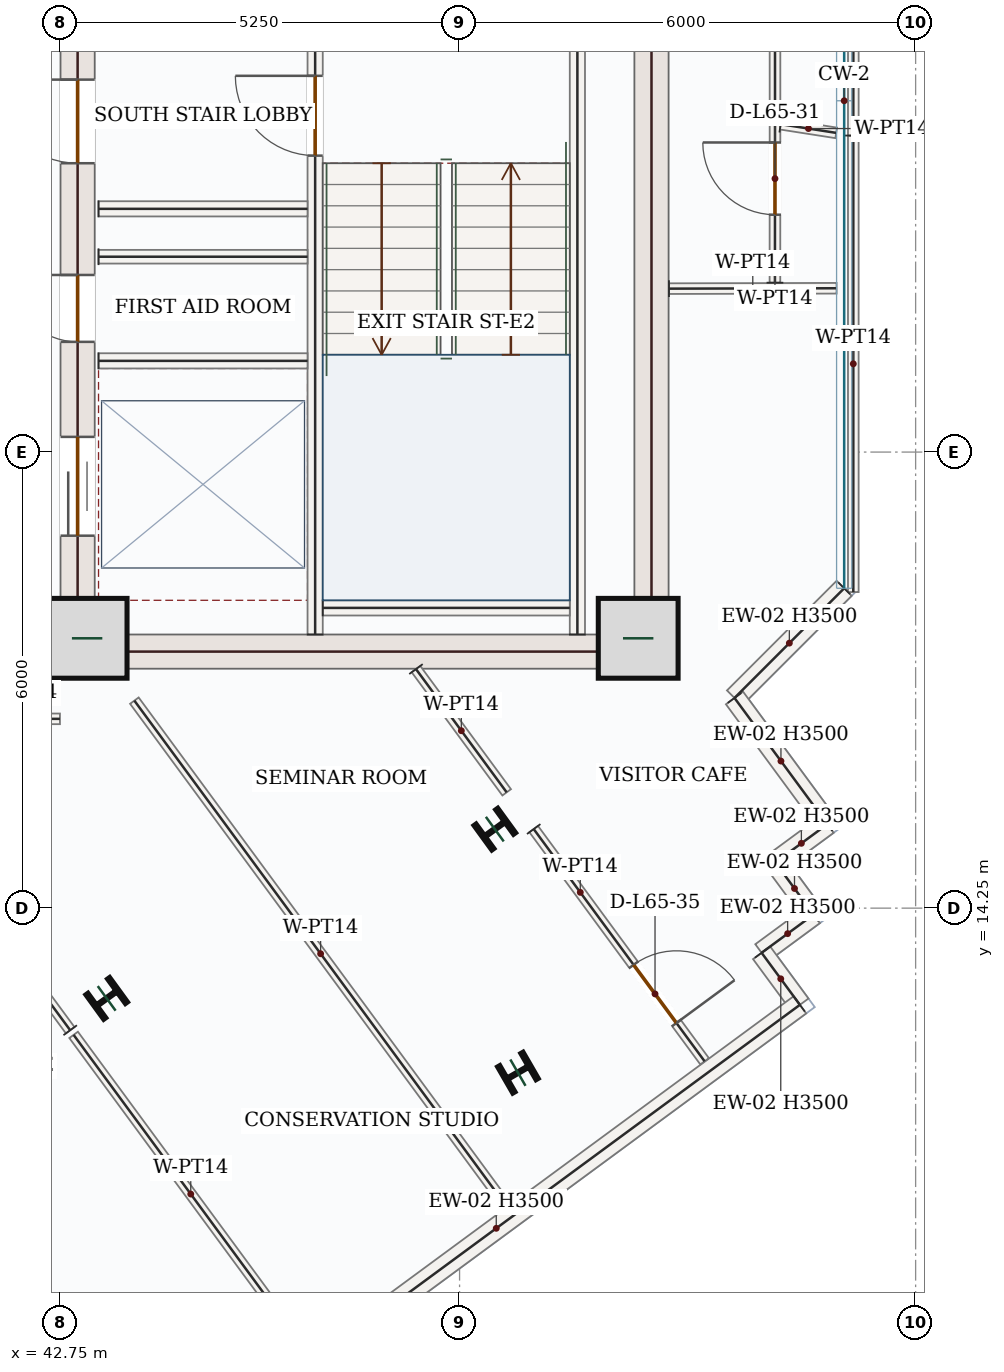
"""IFC4 building model, lengths in metres.
Left out: names, types, materials, properties, quantities, classifications, styles, units other than length and angle.
Written with IfcOpenShell. Run it as: python <this file> out.ifc"""

import sys

from ifc_helpers import new_model, si_unit, direction, frame, frame_2d, origin, origin_2d, place, context, subcontext, project, spatial, rectangle, i_section, extrude, source, transform, mapped, element, fill, save


model = new_model("IFC4")
c1 = context("Model", 3, precision=1e-05, world=origin(), true_north=direction((0.0, 1.0)))
c2 = subcontext(c1, "Body", "Model", "MODEL_VIEW")
j1 = project(units=[si_unit("LENGTHUNIT", "METRE"), si_unit("PLANEANGLEUNIT", "RADIAN")], contexts=[c1])
p1 = place(None, origin())
s1 = spatial("IfcSite", under=j1, at=p1, CompositionType="ELEMENT")
p2 = place(p1, origin())
s2 = spatial("IfcBuilding", under=s1, at=p2, CompositionType="ELEMENT")
p3 = place(p2, frame((0.0, 0.0, 272.85)))
s3 = spatial("IfcBuildingStorey", under=s2, at=p3, CompositionType="ELEMENT", Elevation=272.85)
p4 = place(p3, frame((42.975, 17.4, 0.0), z_axis=(0.0, 0.0, 1.0), x_axis=(0.0, 1.0, 0.0)))
e1 = element("IfcWall", 1, at=p4, inside=s3, PredefinedType="SHEAR", context=c2, shape_type="SweptSolid", body=[
    extrude(rectangle(XDim=8.55, YDim=0.45, at=frame_2d((4.275, 0.0))), origin(), (0.0, 0.0, 1.0), 3.5),
])
p5 = place(p4, frame((6.65, 0.0, 0.0)))
e2 = element("IfcOpeningElement", 2, at=p5, cuts=e1, PredefinedType="OPENING", context=c2, shape_type="SweptSolid", body=[
    extrude(rectangle(XDim=1.1, YDim=2.2, at=frame_2d((0.55, 1.1))), frame((0.0, 0.235, 0.0), z_axis=(0.0, -1.0, 0.0), x_axis=(1.0, 0.0, 0.0)), (0.0, 0.0, 1.0), 0.47),
])
p6 = place(p4, frame((1.75, 0.0, 0.0)))
e3 = element("IfcOpeningElement", 3, at=p6, cuts=e1, PredefinedType="OPENING", context=c2, shape_type="SweptSolid", body=[
    extrude(rectangle(XDim=1.3, YDim=2.2, at=frame_2d((0.65, 1.1))), frame((0.0, 0.235, 0.0), z_axis=(0.0, -1.0, 0.0), x_axis=(1.0, 0.0, 0.0)), (0.0, 0.0, 1.0), 0.47),
])
p7 = place(p4, frame((4.3, 0.0, 0.0)))
e4 = element("IfcOpeningElement", 4, at=p7, cuts=e1, PredefinedType="OPENING", context=c2, shape_type="SweptSolid", body=[
    extrude(rectangle(XDim=0.88, YDim=2.1, at=frame_2d((0.44, 1.05))), frame((0.0, 0.235, 0.0), z_axis=(0.0, -1.0, 0.0), x_axis=(1.0, 0.0, 0.0)), (0.0, 0.0, 1.0), 0.47),
])
m1 = source(origin(), c2, "Body", "SweptSolid", [
    extrude(rectangle(XDim=8.55, YDim=0.45, at=frame_2d((4.275, 0.0))), origin(), (0.0, 0.0, 1.0), 3.5),
])
p8 = place(p3, frame((50.525, 17.4, 0.0), z_axis=(0.0, 0.0, 1.0), x_axis=(0.0, 1.0, 0.0)))
e5 = element("IfcWall", 5, at=p8, inside=s3, PredefinedType="SHEAR", context=c2, shape_type="MappedRepresentation", body=[
    mapped(m1, transform((0.0, 0.0, 0.0), x_axis=(1.0, 0.0, 0.0), y_axis=(0.0, 1.0, 0.0), z_axis=(0.0, 0.0, 1.0), scale=1.0)),
])
m2 = source(origin(), c2, "Body", "SweptSolid", [
    extrude(rectangle(XDim=7.1, YDim=0.45, at=frame_2d((3.55, 0.0))), origin(), (0.0, 0.0, 1.0), 3.5),
])
p9 = place(p3, frame((43.2, 17.625, 0.0), z_axis=(0.0, 0.0, 1.0), x_axis=(1.0, 0.0, 0.0)))
e6 = element("IfcWall", 6, at=p9, inside=s3, PredefinedType="SHEAR", context=c2, shape_type="MappedRepresentation", body=[
    mapped(m2, transform((0.0, 0.0, 0.0), x_axis=(1.0, 0.0, 0.0), y_axis=(0.0, 1.0, 0.0), z_axis=(0.0, 0.0, 1.0), scale=1.0)),
])
m3 = source(origin(), c2, "Body", "SweptSolid", [
    extrude(rectangle(XDim=1.05, YDim=1.05, at=origin_2d()), origin(), (0.0, 0.0, 1.0), 3.75),
])
for number, where, z_axis, x_axis in (
    (7, (43.1, 17.8, 0.0), (0.0, 0.0, 1.0), (1.0, 0.0, 0.0)),
    (8, (50.35, 17.8, 0.0), (0.0, 0.0, 1.0), (1.0, 0.0, 0.0)),
):
    element("IfcColumn", number, at=place(p3, frame(where, z_axis=z_axis, x_axis=x_axis)), inside=s3, PredefinedType="COLUMN", context=c2, shape_type="MappedRepresentation", body=[
        mapped(m3, transform((0.0, 0.0, 0.0), x_axis=(1.0, 0.0, 0.0), y_axis=(0.0, 1.0, 0.0), z_axis=(0.0, 0.0, 1.0), scale=1.0)),
    ])
m4 = source(origin(), c2, "Body", "SweptSolid", [
    extrude(i_section(OverallWidth=0.399, OverallDepth=0.386, WebThickness=0.021, FlangeThickness=0.033, FilletRadius=0.018, at=origin_2d()), origin(), (0.0, 0.0, 1.0), 3.75),
])
for number, where, z_axis, x_axis in (
    (9, (43.357, 13.063, 0.0), (0.0, 0.0, 1.0), (-0.588, 0.809, 0.0)),
    (10, (48.464, 15.289, 0.0), (0.0, 0.0, 1.0), (-0.588, 0.809, 0.0)),
    (11, (48.768, 12.086, 0.0), (0.0, 0.0, 1.0), (-0.5, 0.866, 0.0)),
):
    element("IfcColumn", number, at=place(p3, frame(where, z_axis=z_axis, x_axis=x_axis)), inside=s3, PredefinedType="COLUMN", context=c2, shape_type="MappedRepresentation", body=[
        mapped(m4, transform((0.0, 0.0, 0.0), x_axis=(1.0, 0.0, 0.0), y_axis=(0.0, 1.0, 0.0), z_axis=(0.0, 0.0, 1.0), scale=1.0)),
    ])
m5 = source(origin(), c2, "Body", "SweptSolid", [
    extrude(rectangle(XDim=2.041, YDim=0.28, at=frame_2d((1.02, 0.0))), origin(), (0.0, 0.0, 1.0), 3.5),
])
p10 = place(p3, frame((53.06, 18.458, 0.0), z_axis=(0.0, 0.0, 1.0), x_axis=(-0.707106781187, -0.707106781187, 0.0)))
e12 = element("IfcWall", 12, at=p10, inside=s3, PredefinedType="SOLIDWALL", context=c2, shape_type="MappedRepresentation", body=[
    mapped(m5, transform((0.0, 0.0, 0.0), x_axis=(1.0, 0.0, 0.0), y_axis=(0.0, 1.0, 0.0), z_axis=(0.0, 0.0, 1.0), scale=1.0)),
])
m6 = source(origin(), c2, "Body", "SweptSolid", [
    extrude(rectangle(XDim=2.062, YDim=0.28, at=frame_2d((1.031, 0.0))), origin(), (0.0, 0.0, 1.0), 3.5),
])
p11 = place(p3, frame((51.617, 17.015, 0.0), z_axis=(0.0, 0.0, 1.0), x_axis=(0.592718215209, -0.80540990642, 0.0)))
e13 = element("IfcWall", 13, at=p11, inside=s3, PredefinedType="SOLIDWALL", context=c2, shape_type="MappedRepresentation", body=[
    mapped(m6, transform((0.0, 0.0, 0.0), x_axis=(1.0, 0.0, 0.0), y_axis=(0.0, 1.0, 0.0), z_axis=(0.0, 0.0, 1.0), scale=1.0)),
])
m7 = source(origin(), c2, "Body", "SweptSolid", [
    extrude(rectangle(XDim=0.85, YDim=0.28, at=frame_2d((0.425, 0.0))), origin(), (0.0, 0.0, 1.0), 3.5),
])
p12 = place(p3, frame((52.839, 15.355, 0.0), z_axis=(0.0, 0.0, 1.0), x_axis=(-0.80534450163, -0.592807079659, 0.0)))
e14 = element("IfcWall", 14, at=p12, inside=s3, PredefinedType="SOLIDWALL", context=c2, shape_type="MappedRepresentation", body=[
    mapped(m7, transform((0.0, 0.0, 0.0), x_axis=(1.0, 0.0, 0.0), y_axis=(0.0, 1.0, 0.0), z_axis=(0.0, 0.0, 1.0), scale=1.0)),
])
m8 = source(origin(), c2, "Body", "SweptSolid", [
    extrude(rectangle(XDim=0.85, YDim=0.28, at=frame_2d((0.425, 0.0))), origin(), (0.0, 0.0, 1.0), 3.5),
])
for number, where, z_axis, x_axis in (
    (15, (52.155, 14.851, 0.0), (0.0, 0.0, 1.0), (0.593, -0.805, 0.0)),
    (16, (52.658, 14.166, 0.0), (0.0, 0.0, 1.0), (-0.805, -0.593, 0.0)),
):
    element("IfcWall", number, at=place(p3, frame(where, z_axis=z_axis, x_axis=x_axis)), inside=s3, PredefinedType="SOLIDWALL", context=c2, shape_type="MappedRepresentation", body=[
        mapped(m8, transform((0.0, 0.0, 0.0), x_axis=(1.0, 0.0, 0.0), y_axis=(0.0, 1.0, 0.0), z_axis=(0.0, 0.0, 1.0), scale=1.0)),
    ])
m9 = source(origin(), c2, "Body", "SweptSolid", [
    extrude(rectangle(XDim=0.85, YDim=0.28, at=frame_2d((0.425, 0.0))), origin(), (0.0, 0.0, 1.0), 3.5),
])
p13 = place(p3, frame((51.974, 13.663, 0.0), z_axis=(0.0, 0.0, 1.0), x_axis=(0.592669983425, -0.805445398986, 0.0)))
e17 = element("IfcWall", 17, at=p13, inside=s3, PredefinedType="SOLIDWALL", context=c2, shape_type="MappedRepresentation", body=[
    mapped(m9, transform((0.0, 0.0, 0.0), x_axis=(1.0, 0.0, 0.0), y_axis=(0.0, 1.0, 0.0), z_axis=(0.0, 0.0, 1.0), scale=1.0)),
])
m10 = source(origin(), c2, "Body", "SweptSolid", [
    extrude(rectangle(XDim=9.92, YDim=0.28, at=frame_2d((4.96, 0.0))), origin(), (0.0, 0.0, 1.0), 3.5),
])
p14 = place(p3, frame((52.478, 12.978, 0.0), z_axis=(0.0, 0.0, 1.0), x_axis=(-0.805418797839, -0.592706132994, 0.0)))
e18 = element("IfcWall", 18, at=p14, inside=s3, PredefinedType="SOLIDWALL", context=c2, shape_type="MappedRepresentation", body=[
    mapped(m10, transform((0.0, 0.0, 0.0), x_axis=(1.0, 0.0, 0.0), y_axis=(0.0, 1.0, 0.0), z_axis=(0.0, 0.0, 1.0), scale=1.0)),
])
m11 = source(origin(), c2, "Body", "SweptSolid", [
    extrude(rectangle(XDim=7.87, YDim=0.2, at=frame_2d((3.935, 0.0))), origin(), (0.0, 0.0, 1.0), 3.5),
])
p15 = place(p3, frame((49.55, 17.85, 0.0), z_axis=(0.0, 0.0, 1.0), x_axis=(0.0, 1.0, 0.0)))
e19 = element("IfcWall", 19, at=p15, inside=s3, PredefinedType="SOLIDWALL", context=c2, shape_type="MappedRepresentation", body=[
    mapped(m11, transform((0.0, 0.0, 0.0), x_axis=(1.0, 0.0, 0.0), y_axis=(0.0, 1.0, 0.0), z_axis=(0.0, 0.0, 1.0), scale=1.0)),
])
p16 = place(p3, frame((46.1, 17.85, 0.0), z_axis=(0.0, 0.0, 1.0), x_axis=(0.0, 1.0, 0.0)))
e20 = element("IfcWall", 20, at=p16, inside=s3, PredefinedType="SOLIDWALL", context=c2, shape_type="SweptSolid", body=[
    extrude(rectangle(XDim=8.0, YDim=0.2, at=frame_2d((4.0, 0.0))), origin(), (0.0, 0.0, 1.0), 3.5),
])
p17 = place(p16, frame((6.3, 0.0, 0.0)))
e21 = element("IfcOpeningElement", 21, at=p17, cuts=e20, PredefinedType="OPENING", context=c2, shape_type="SweptSolid", body=[
    extrude(rectangle(XDim=1.05, YDim=2.15, at=frame_2d((0.525, 1.075))), frame((0.0, 0.11, 0.0), z_axis=(0.0, -1.0, 0.0), x_axis=(1.0, 0.0, 0.0)), (0.0, 0.0, 1.0), 0.22),
])
m12 = source(origin(), c2, "Body", "SweptSolid", [
    extrude(rectangle(XDim=3.25, YDim=0.2, at=frame_2d((1.625, 0.0))), origin(), (0.0, 0.0, 1.0), 3.5),
])
p18 = place(p3, frame((46.2, 18.2, 0.0), z_axis=(0.0, 0.0, 1.0), x_axis=(1.0, 0.0, 0.0)))
e22 = element("IfcWall", 22, at=p18, inside=s3, PredefinedType="SOLIDWALL", context=c2, shape_type="MappedRepresentation", body=[
    mapped(m12, transform((0.0, 0.0, 0.0), x_axis=(1.0, 0.0, 0.0), y_axis=(0.0, 1.0, 0.0), z_axis=(0.0, 0.0, 1.0), scale=1.0)),
])
m13 = source(origin(), c2, "Body", "SweptSolid", [
    extrude(rectangle(XDim=2.75, YDim=0.2, at=frame_2d((1.375, 0.0))), origin(), (0.0, 0.0, 1.0), 3.5),
])
for number, where, z_axis, x_axis in (
    (23, (43.25, 23.45, 0.0), (0.0, 0.0, 1.0), (1.0, 0.0, 0.0)),
    (24, (43.25, 21.45, 0.0), (0.0, 0.0, 1.0), (1.0, 0.0, 0.0)),
):
    element("IfcWall", number, at=place(p3, frame(where, z_axis=z_axis, x_axis=x_axis)), inside=s3, PredefinedType="SOLIDWALL", context=c2, shape_type="MappedRepresentation", body=[
        mapped(m13, transform((0.0, 0.0, 0.0), x_axis=(1.0, 0.0, 0.0), y_axis=(0.0, 1.0, 0.0), z_axis=(0.0, 0.0, 1.0), scale=1.0)),
    ])
m14 = source(origin(), c2, "Body", "SweptSolid", [
    extrude(rectangle(XDim=2.75, YDim=0.18, at=frame_2d((1.375, 0.0))), origin(), (0.0, 0.0, 1.0), 3.5),
])
p19 = place(p3, frame((43.25, 22.82, 0.0), z_axis=(0.0, 0.0, 1.0), x_axis=(1.0, 0.0, 0.0)))
e25 = element("IfcWall", 25, at=p19, inside=s3, PredefinedType="PARTITIONING", context=c2, shape_type="MappedRepresentation", body=[
    mapped(m14, transform((0.0, 0.0, 0.0), x_axis=(1.0, 0.0, 0.0), y_axis=(0.0, 1.0, 0.0), z_axis=(0.0, 0.0, 1.0), scale=1.0)),
])
m15 = source(origin(), c2, "Body", "SweptSolid", [
    extrude(rectangle(XDim=8.268, YDim=0.14, at=frame_2d((4.134, 0.0))), origin(), (0.0, 0.0, 1.0), 3.5),
])
p20 = place(p3, frame((48.622, 10.321, 0.0), z_axis=(0.0, 0.0, 1.0), x_axis=(-0.592718477136, 0.805409713663, 0.0)))
e26 = element("IfcWall", 26, at=p20, inside=s3, PredefinedType="PARTITIONING", context=c2, shape_type="MappedRepresentation", body=[
    mapped(m15, transform((0.0, 0.0, 0.0), x_axis=(1.0, 0.0, 0.0), y_axis=(0.0, 1.0, 0.0), z_axis=(0.0, 0.0, 1.0), scale=1.0)),
])
m16 = source(origin(), c2, "Body", "SweptSolid", [
    extrude(rectangle(XDim=2.013, YDim=0.14, at=frame_2d((1.006, 0.0))), origin(), (0.0, 0.0, 1.0), 3.5),
])
p21 = place(p3, frame((47.427, 17.395, 0.0), z_axis=(0.0, 0.0, 1.0), x_axis=(0.592698341467, -0.80542453155, 0.0)))
e27 = element("IfcWall", 27, at=p21, inside=s3, PredefinedType="PARTITIONING", context=c2, shape_type="MappedRepresentation", body=[
    mapped(m16, transform((0.0, 0.0, 0.0), x_axis=(1.0, 0.0, 0.0), y_axis=(0.0, 1.0, 0.0), z_axis=(0.0, 0.0, 1.0), scale=1.0)),
])
p22 = place(p3, frame((48.975, 15.29, 0.0), z_axis=(0.0, 0.0, 1.0), x_axis=(0.592735674873, -0.805397057192, 0.0)))
e28 = element("IfcWall", 28, at=p22, inside=s3, PredefinedType="PARTITIONING", context=c2, shape_type="SweptSolid", body=[
    extrude(rectangle(XDim=3.793, YDim=0.14, at=frame_2d((1.896, 0.0))), origin(), (0.0, 0.0, 1.0), 3.5),
])
p23 = place(p22, frame((2.218, 0.0, 0.0)))
e29 = element("IfcOpeningElement", 29, at=p23, cuts=e28, PredefinedType="OPENING", context=c2, shape_type="SweptSolid", body=[
    extrude(rectangle(XDim=0.95, YDim=2.15, at=frame_2d((0.475, 1.075))), frame((0.0, 0.08, 0.0), z_axis=(0.0, -1.0, 0.0), x_axis=(1.0, 0.0, 0.0)), (0.0, 0.0, 1.0), 0.16),
])
m17 = source(origin(), c2, "Body", "SweptSolid", [
    extrude(rectangle(XDim=2.205, YDim=0.14, at=frame_2d((1.103, 0.0))), origin(), (0.0, 0.0, 1.0), 3.5),
])
p24 = place(p3, frame((50.755, 22.4, 0.0), z_axis=(0.0, 0.0, 1.0), x_axis=(0.999997297044, 0.002325060146, 0.0)))
e30 = element("IfcWall", 30, at=p24, inside=s3, PredefinedType="PARTITIONING", context=c2, shape_type="MappedRepresentation", body=[
    mapped(m17, transform((0.0, 0.0, 0.0), x_axis=(1.0, 0.0, 0.0), y_axis=(0.0, 1.0, 0.0), z_axis=(0.0, 0.0, 1.0), scale=1.0)),
])
p25 = place(p3, frame((52.149, 22.478, 0.0), z_axis=(0.0, 0.0, 1.0), x_axis=(0.000465766135, 0.999999891531, 0.0)))
e31 = element("IfcWall", 31, at=p25, inside=s3, PredefinedType="PARTITIONING", context=c2, shape_type="SweptSolid", body=[
    extrude(rectangle(XDim=2.097, YDim=0.14, at=frame_2d((1.048, 0.0))), origin(), (0.0, 0.0, 1.0), 3.5),
])
p26 = place(p25, frame((0.894, 0.0, 0.0)))
e32 = element("IfcOpeningElement", 32, at=p26, cuts=e31, PredefinedType="OPENING", context=c2, shape_type="SweptSolid", body=[
    extrude(rectangle(XDim=0.95, YDim=2.15, at=frame_2d((0.475, 1.075))), frame((0.0, 0.08, 0.0), z_axis=(0.0, -1.0, 0.0), x_axis=(1.0, 0.0, 0.0)), (0.0, 0.0, 1.0), 0.16),
])
m18 = source(origin(), c2, "Body", "SweptSolid", [
    extrude(rectangle(XDim=0.739, YDim=0.14, at=frame_2d((0.369, 0.0))), origin(), (0.0, 0.0, 1.0), 3.5),
])
p27 = place(p3, frame((52.225, 24.563, 0.0), z_axis=(0.0, 0.0, 1.0), x_axis=(0.988021482099, -0.154316398709, 0.0)))
e33 = element("IfcWall", 33, at=p27, inside=s3, PredefinedType="PARTITIONING", context=c2, shape_type="MappedRepresentation", body=[
    mapped(m18, transform((0.0, 0.0, 0.0), x_axis=(1.0, 0.0, 0.0), y_axis=(0.0, 1.0, 0.0), z_axis=(0.0, 0.0, 1.0), scale=1.0)),
])
m19 = source(origin(), c2, "Body", "SweptSolid", [
    extrude(rectangle(XDim=6.006, YDim=0.14, at=frame_2d((3.003, 0.0))), origin(), (0.0, 0.0, 1.0), 3.5),
])
p28 = place(p3, frame((53.18, 24.414, 0.0), z_axis=(0.0, 0.0, 1.0), x_axis=(0.0, -1.0, 0.0)))
e34 = element("IfcWall", 34, at=p28, inside=s3, PredefinedType="PARTITIONING", context=c2, shape_type="MappedRepresentation", body=[
    mapped(m19, transform((0.0, 0.0, 0.0), x_axis=(1.0, 0.0, 0.0), y_axis=(0.0, 1.0, 0.0), z_axis=(0.0, 0.0, 1.0), scale=1.0)),
])
m20 = source(origin(), c2, "Body", "SweptSolid", [
    extrude(rectangle(XDim=5.2, YDim=0.14, at=frame_2d((2.6, 0.0))), origin(), (0.0, 0.0, 1.0), 3.5),
])
p29 = place(p3, frame((46.005, 8.394, 0.0), z_axis=(0.0, 0.0, 1.0), x_axis=(-0.592704087561, 0.805420303065, 0.0)))
e35 = element("IfcWall", 35, at=p29, inside=s3, PredefinedType="PARTITIONING", context=c2, shape_type="MappedRepresentation", body=[
    mapped(m20, transform((0.0, 0.0, 0.0), x_axis=(1.0, 0.0, 0.0), y_axis=(0.0, 1.0, 0.0), z_axis=(0.0, 0.0, 1.0), scale=1.0)),
])
m21 = source(origin(), c2, "Body", "SweptSolid", [
    extrude(rectangle(XDim=5.086, YDim=0.14, at=frame_2d((2.543, 0.0))), origin(), (0.0, 0.0, 1.0), 3.5),
])
p30 = place(p3, frame((42.877, 12.644, 0.0), z_axis=(0.0, 0.0, 1.0), x_axis=(-0.592678177251, 0.805439369668, 0.0)))
e36 = element("IfcWall", 36, at=p30, inside=s3, PredefinedType="PARTITIONING", context=c2, shape_type="MappedRepresentation", body=[
    mapped(m21, transform((0.0, 0.0, 0.0), x_axis=(1.0, 0.0, 0.0), y_axis=(0.0, 1.0, 0.0), z_axis=(0.0, 0.0, 1.0), scale=1.0)),
])
p31 = place(p3, frame((39.956, 16.74, 0.0), z_axis=(0.0, 0.0, 1.0), x_axis=(0.999999996161, 8.7619381e-05, 0.0)))
e37 = element("IfcWall", 37, at=p31, inside=s3, PredefinedType="PARTITIONING", context=c2, shape_type="SweptSolid", body=[
    extrude(rectangle(XDim=2.786, YDim=0.14, at=frame_2d((1.393, 0.0))), origin(), (0.0, 0.0, 1.0), 3.5),
])
p32 = place(p31, frame((0.643, 0.0, 0.0)))
e38 = element("IfcOpeningElement", 38, at=p32, cuts=e37, PredefinedType="OPENING", context=c2, shape_type="SweptSolid", body=[
    extrude(rectangle(XDim=0.95, YDim=2.15, at=frame_2d((0.475, 1.075))), frame((0.0, 0.08, 0.0), z_axis=(0.0, -1.0, 0.0), x_axis=(1.0, 0.0, 0.0)), (0.0, 0.0, 1.0), 0.16),
])
m22 = source(origin(), c2, "Body", "SweptSolid", [
    extrude(rectangle(XDim=6.782, YDim=0.14, at=frame_2d((3.391, 0.0))), origin(), (0.0, 0.0, 1.0), 3.5),
])
p33 = place(p3, frame((53.183, 31.196, 0.0), z_axis=(0.0, 0.0, 1.0), x_axis=(-0.000467979358, -0.999999890498, 0.0)))
e39 = element("IfcWall", 39, at=p33, inside=s3, PredefinedType="PARTITIONING", context=c2, shape_type="MappedRepresentation", body=[
    mapped(m22, transform((0.0, 0.0, 0.0), x_axis=(1.0, 0.0, 0.0), y_axis=(0.0, 1.0, 0.0), z_axis=(0.0, 0.0, 1.0), scale=1.0)),
])
p34 = place(p3, frame((52.15, 24.575, 0.0), z_axis=(0.0, 0.0, 1.0), x_axis=(-0.000139028882, 0.999999990335, 0.0)))
e40 = element("IfcWall", 40, at=p34, inside=s3, PredefinedType="PARTITIONING", context=c2, shape_type="SweptSolid", body=[
    extrude(rectangle(XDim=7.024, YDim=0.14, at=frame_2d((3.512, 0.0))), origin(), (0.0, 0.0, 1.0), 3.5),
])
p35 = place(p34, frame((1.336, 0.0, 0.0)))
e41 = element("IfcOpeningElement", 41, at=p35, cuts=e40, PredefinedType="OPENING", context=c2, shape_type="SweptSolid", body=[
    extrude(rectangle(XDim=0.95, YDim=2.15, at=frame_2d((0.475, 1.075))), frame((0.0, 0.08, 0.0), z_axis=(0.0, -1.0, 0.0), x_axis=(1.0, 0.0, 0.0)), (0.0, 0.0, 1.0), 0.16),
])
m23 = source(origin(), c2, "Body", "SweptSolid", [
    extrude(rectangle(XDim=1.05, YDim=2.15, at=frame_2d((0.525, 1.075))), frame((0.0, 0.025, 0.0), z_axis=(0.0, -1.0, 0.0), x_axis=(1.0, 0.0, 0.0)), (0.0, 0.0, 1.0), 0.05),
])
p36 = place(p17, origin())
e42 = element("IfcDoor", 42, at=p36, inside=s3, OperationType="SINGLE_SWING_RIGHT", PredefinedType="DOOR", context=c2, shape_type="MappedRepresentation", body=[
    mapped(m23, transform((0.0, 0.0, 0.0), x_axis=(1.0, 0.0, 0.0), y_axis=(0.0, 1.0, 0.0), z_axis=(0.0, 0.0, 1.0), scale=1.0)),
])
fill(e21, e42)
m24 = source(origin(), c2, "Body", "SweptSolid", [
    extrude(rectangle(XDim=1.1, YDim=2.2, at=frame_2d((0.55, 1.1))), frame((0.0, 0.025, 0.0), z_axis=(0.0, -1.0, 0.0), x_axis=(1.0, 0.0, 0.0)), (0.0, 0.0, 1.0), 0.05),
])
p37 = place(p5, origin())
e43 = element("IfcDoor", 43, at=p37, inside=s3, OperationType="SINGLE_SWING_RIGHT", PredefinedType="DOOR", context=c2, shape_type="MappedRepresentation", body=[
    mapped(m24, transform((0.0, 0.0, 0.0), x_axis=(1.0, 0.0, 0.0), y_axis=(0.0, 1.0, 0.0), z_axis=(0.0, 0.0, 1.0), scale=1.0)),
])
fill(e2, e43)
m25 = source(origin(), c2, "Body", "SweptSolid", [
    extrude(rectangle(XDim=1.3, YDim=2.2, at=frame_2d((0.65, 1.1))), frame((0.0, 0.025, 0.0), z_axis=(0.0, -1.0, 0.0), x_axis=(1.0, 0.0, 0.0)), (0.0, 0.0, 1.0), 0.05),
])
p38 = place(p6, origin())
e44 = element("IfcDoor", 44, at=p38, inside=s3, OperationType="DOUBLE_DOOR_SLIDING", PredefinedType="DOOR", context=c2, shape_type="MappedRepresentation", body=[
    mapped(m25, transform((0.0, 0.0, 0.0), x_axis=(1.0, 0.0, 0.0), y_axis=(0.0, 1.0, 0.0), z_axis=(0.0, 0.0, 1.0), scale=1.0)),
])
fill(e3, e44)
m26 = source(origin(), c2, "Body", "SweptSolid", [
    extrude(rectangle(XDim=0.88, YDim=2.1, at=frame_2d((0.44, 1.05))), frame((0.0, 0.025, 0.0), z_axis=(0.0, -1.0, 0.0), x_axis=(1.0, 0.0, 0.0)), (0.0, 0.0, 1.0), 0.05),
])
p39 = place(p7, origin())
e45 = element("IfcDoor", 45, at=p39, inside=s3, OperationType="SINGLE_SWING_RIGHT", PredefinedType="DOOR", context=c2, shape_type="MappedRepresentation", body=[
    mapped(m26, transform((0.0, 0.0, 0.0), x_axis=(1.0, 0.0, 0.0), y_axis=(0.0, 1.0, 0.0), z_axis=(0.0, 0.0, 1.0), scale=1.0)),
])
fill(e4, e45)
m27 = source(origin(), c2, "Body", "SweptSolid", [
    extrude(rectangle(XDim=0.95, YDim=2.15, at=frame_2d((0.475, 1.075))), frame((0.0, 0.025, 0.0), z_axis=(0.0, -1.0, 0.0), x_axis=(1.0, 0.0, 0.0)), (0.0, 0.0, 1.0), 0.05),
])
p40 = place(p26, origin())
e46 = element("IfcDoor", 46, at=p40, inside=s3, OperationType="SINGLE_SWING_RIGHT", PredefinedType="DOOR", context=c2, shape_type="MappedRepresentation", body=[
    mapped(m27, transform((0.0, 0.0, 0.0), x_axis=(1.0, 0.0, 0.0), y_axis=(0.0, 1.0, 0.0), z_axis=(0.0, 0.0, 1.0), scale=1.0)),
])
fill(e32, e46)
p41 = place(p23, origin())
e47 = element("IfcDoor", 47, at=p41, inside=s3, OperationType="SINGLE_SWING_RIGHT", PredefinedType="DOOR", context=c2, shape_type="MappedRepresentation", body=[
    mapped(m27, transform((0.0, 0.0, 0.0), x_axis=(1.0, 0.0, 0.0), y_axis=(0.0, 1.0, 0.0), z_axis=(0.0, 0.0, 1.0), scale=1.0)),
])
fill(e29, e47)
save(model, sys.argv[1])
